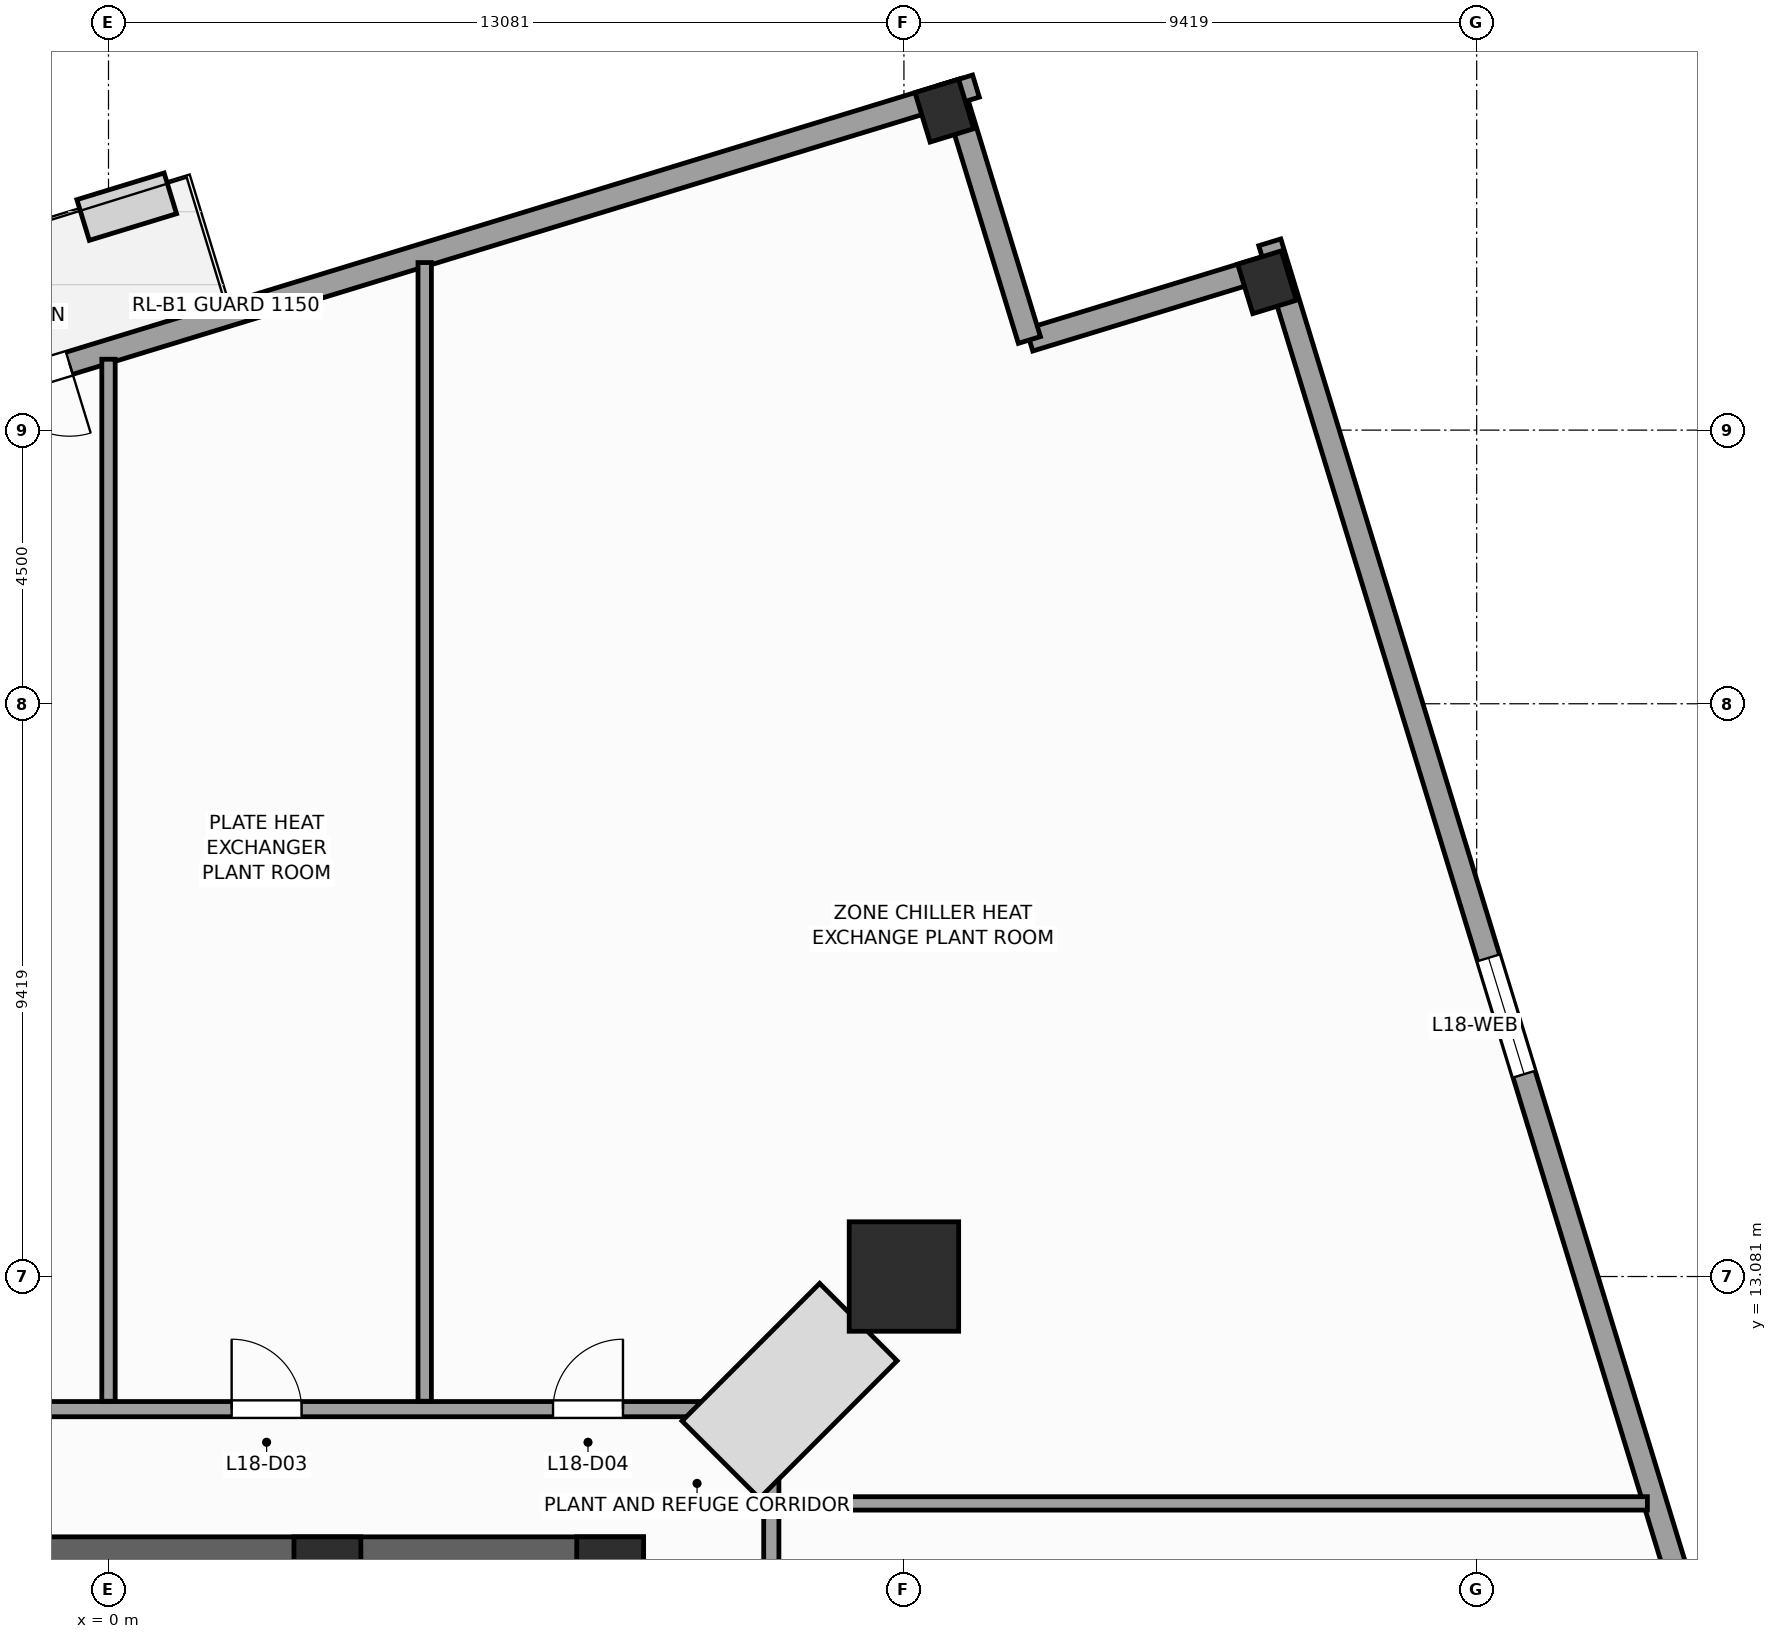
"""IFC4 building model, lengths in metres.
Left out: names, types, materials, properties, quantities, classifications, styles, units other than length and angle.
Written with IfcOpenShell. Run it as: python <this file> out.ifc"""

import sys

from ifc_helpers import new_model, si_unit, direction, frame, frame_2d, origin, origin_2d, place, context, subcontext, project, spatial, rectangle, extrude, source, transform, mapped, element, fill, save


model = new_model("IFC4")
c1 = context("Model", 3, precision=1e-05, world=origin(), true_north=direction((0.0, 1.0)))
c2 = subcontext(c1, "Body", "Model", "MODEL_VIEW")
j1 = project(units=[si_unit("LENGTHUNIT", "METRE"), si_unit("PLANEANGLEUNIT", "RADIAN")], contexts=[c1])
p1 = place(None, origin())
s1 = spatial("IfcSite", under=j1, at=p1, CompositionType="ELEMENT")
p2 = place(p1, origin())
s2 = spatial("IfcBuilding", under=s1, at=p2, CompositionType="ELEMENT")
p3 = place(p2, frame((0.0, 0.0, 78.0)))
s3 = spatial("IfcBuildingStorey", under=s2, at=p3, CompositionType="ELEMENT", Elevation=78.0)
p4 = place(p3, frame((-8.8, 8.4, 0.0), z_axis=(0.0, 0.0, 1.0), x_axis=(1.0, 0.0, 0.0)))
e1 = element("IfcWall", 1, at=p4, inside=s3, PredefinedType="SHEAR", context=c2, shape_type="SweptSolid", body=[
    extrude(rectangle(XDim=17.6, YDim=0.8, at=frame_2d((8.8, 0.0))), origin(), (0.0, 0.0, 1.0), 5.2),
])
m1 = source(origin(), c2, "Body", "SweptSolid", [
    extrude(rectangle(XDim=1.1, YDim=1.1, at=origin_2d()), origin(), (0.0, 0.0, 1.0), 5.2),
])
for number, where, z_axis, x_axis in (
    (2, (8.25, 8.25, 0.0), (0.0, 0.0, 1.0), (1.0, 0.0, 0.0)),
    (3, (3.6, 8.25, 0.0), (0.0, 0.0, 1.0), (1.0, 0.0, 0.0)),
):
    element("IfcColumn", number, at=place(p3, frame(where, z_axis=z_axis, x_axis=x_axis)), inside=s3, PredefinedType="PILASTER", context=c2, shape_type="MappedRepresentation", body=[
        mapped(m1, transform((0.0, 0.0, 0.0), scale=1.0)),
    ])
m2 = source(origin(), c2, "Body", "SweptSolid", [
    extrude(rectangle(XDim=1.8, YDim=1.8, at=origin_2d()), origin(), (0.0, 0.0, 1.0), 5.2),
])
p5 = place(p3, frame((13.081, 13.081, 0.0), z_axis=(0.0, 0.0, 1.0), x_axis=(1.0, 0.0, 0.0)))
e4 = element("IfcColumn", 4, at=p5, inside=s3, PredefinedType="COLUMN", context=c2, shape_type="MappedRepresentation", body=[
    mapped(m2, transform((0.0, 0.0, 0.0), scale=1.0)),
])
m3 = source(origin(), c2, "Body", "SweptSolid", [
    extrude(rectangle(XDim=0.75, YDim=0.85, at=origin_2d()), origin(), (0.0, 0.0, 1.0), 5.2),
])
for number, where, z_axis, x_axis in (
    (5, (19.052, 29.431, 0.0), (0.0, 0.0, 1.0), (0.956, 0.292, 0.0)),
    (6, (13.746, 32.253, 0.0), (0.0, 0.0, 1.0), (0.956, 0.292, 0.0)),
):
    element("IfcColumn", number, at=place(p3, frame(where, z_axis=z_axis, x_axis=x_axis)), inside=s3, PredefinedType="COLUMN", context=c2, shape_type="MappedRepresentation", body=[
        mapped(m3, transform((0.0, 0.0, 0.0), scale=1.0)),
    ])
p6 = place(p3, frame((19.208, 29.725, 0.0), z_axis=(0.0, 0.0, 1.0), x_axis=(-0.956312764915, -0.292345507338, 0.0)))
e7 = element("IfcWall", 7, at=p6, inside=s3, PredefinedType="STANDARD", context=c2, shape_type="SweptSolid", body=[
    extrude(rectangle(XDim=4.25, YDim=0.38, at=frame_2d((2.125, 0.0))), origin(), (0.0, 0.0, 1.0), 4.94),
])
p7 = place(p3, frame((15.144, 28.482, 0.0), z_axis=(0.0, 0.0, 1.0), x_axis=(-0.292373601522, 0.956304176051, 0.0)))
e8 = element("IfcWall", 8, at=p7, inside=s3, PredefinedType="STANDARD", context=c2, shape_type="SweptSolid", body=[
    extrude(rectangle(XDim=4.44, YDim=0.38, at=frame_2d((2.22, 0.0))), origin(), (0.0, 0.0, 1.0), 4.24),
])
p8 = place(p3, frame((26.17, 6.955, 0.0), z_axis=(0.0, 0.0, 1.0), x_axis=(-0.292372634538, 0.95630447169, 0.0)))
e9 = element("IfcWall", 9, at=p8, inside=s3, PredefinedType="STANDARD", context=c2, shape_type="SweptSolid", body=[
    extrude(rectangle(XDim=24.19, YDim=0.38, at=frame_2d((12.095, 0.0))), origin(), (0.0, 0.0, 1.0), 4.34),
])
p9 = place(p8, frame((9.885, 0.0, 0.65)))
e10 = element("IfcOpeningElement", 10, at=p9, cuts=e9, PredefinedType="OPENING", context=c2, shape_type="SweptSolid", body=[
    extrude(rectangle(XDim=2.0, YDim=1.45, at=frame_2d((1.0, 0.725))), frame((0.0, 0.2, 0.0), z_axis=(0.0, -1.0, 0.0), x_axis=(1.0, 0.0, 0.0)), (0.0, 0.0, 1.0), 0.4),
])
p10 = place(p3, frame((14.265, 32.658, 0.0), z_axis=(0.0, 0.0, 1.0), x_axis=(-0.956302978664, -0.292377517944, 0.0)))
e11 = element("IfcWall", 11, at=p10, inside=s3, PredefinedType="STANDARD", context=c2, shape_type="SweptSolid", body=[
    extrude(rectangle(XDim=17.79, YDim=0.38, at=frame_2d((8.895, 0.0))), origin(), (0.0, 0.0, 1.0), 4.34),
])
p11 = place(p10, frame((15.59, 0.0, 0.0)))
e12 = element("IfcOpeningElement", 12, at=p11, cuts=e11, PredefinedType="OPENING", context=c2, shape_type="SweptSolid", body=[
    extrude(rectangle(XDim=1.2, YDim=2.3, at=frame_2d((0.6, 1.15))), frame((0.0, 0.2, 0.0), z_axis=(0.0, -1.0, 0.0), x_axis=(1.0, 0.0, 0.0)), (0.0, 0.0, 1.0), 0.4),
])
p12 = place(p3, frame((-10.9, 10.9, 0.0), z_axis=(0.0, 0.0, 1.0), x_axis=(1.0, 0.0, 0.0)))
e13 = element("IfcWall", 13, at=p12, inside=s3, PredefinedType="PARTITIONING", context=c2, shape_type="SweptSolid", body=[
    extrude(rectangle(XDim=21.8, YDim=0.25, at=frame_2d((10.9, 0.0))), origin(), (0.0, 0.0, 1.0), 4.94),
])
p13 = place(p12, frame((2.439, 0.0, 0.0)))
e14 = element("IfcOpeningElement", 14, at=p13, cuts=e13, PredefinedType="OPENING", context=c2, shape_type="SweptSolid", body=[
    extrude(rectangle(XDim=1.15, YDim=2.25, at=frame_2d((0.575, 1.125))), frame((0.0, 0.135, 0.0), z_axis=(0.0, -1.0, 0.0), x_axis=(1.0, 0.0, 0.0)), (0.0, 0.0, 1.0), 0.27),
])
p14 = place(p12, frame((7.725, 0.0, 0.0)))
e15 = element("IfcOpeningElement", 15, at=p14, cuts=e13, PredefinedType="OPENING", context=c2, shape_type="SweptSolid", body=[
    extrude(rectangle(XDim=1.15, YDim=2.25, at=frame_2d((0.575, 1.125))), frame((0.0, 0.135, 0.0), z_axis=(0.0, -1.0, 0.0), x_axis=(1.0, 0.0, 0.0)), (0.0, 0.0, 1.0), 0.27),
])
p15 = place(p12, frame((12.925, 0.0, 0.0)))
e16 = element("IfcOpeningElement", 16, at=p15, cuts=e13, PredefinedType="OPENING", context=c2, shape_type="SweptSolid", body=[
    extrude(rectangle(XDim=1.15, YDim=2.25, at=frame_2d((0.575, 1.125))), frame((0.0, 0.135, 0.0), z_axis=(0.0, -1.0, 0.0), x_axis=(1.0, 0.0, 0.0)), (0.0, 0.0, 1.0), 0.27),
])
p16 = place(p12, frame((18.21, 0.0, 0.0)))
e17 = element("IfcOpeningElement", 17, at=p16, cuts=e13, PredefinedType="OPENING", context=c2, shape_type="SweptSolid", body=[
    extrude(rectangle(XDim=1.15, YDim=2.25, at=frame_2d((0.575, 1.125))), frame((0.0, 0.135, 0.0), z_axis=(0.0, -1.0, 0.0), x_axis=(1.0, 0.0, 0.0)), (0.0, 0.0, 1.0), 0.27),
])
p17 = place(p3, frame((10.9, -10.8, 0.0), z_axis=(0.0, 0.0, 1.0), x_axis=(0.0, 1.0, 0.0)))
e18 = element("IfcWall", 18, at=p17, inside=s3, PredefinedType="PARTITIONING", context=c2, shape_type="SweptSolid", body=[
    extrude(rectangle(XDim=21.6, YDim=0.25, at=frame_2d((10.8, 0.0))), origin(), (0.0, 0.0, 1.0), 4.94),
])
p18 = place(p17, frame((11.5, 0.0, 0.0)))
e19 = element("IfcOpeningElement", 19, at=p18, cuts=e18, PredefinedType="OPENING", context=c2, shape_type="SweptSolid", body=[
    extrude(rectangle(XDim=1.15, YDim=2.25, at=frame_2d((0.575, 1.125))), frame((0.0, 0.135, 0.0), z_axis=(0.0, -1.0, 0.0), x_axis=(1.0, 0.0, 0.0)), (0.0, 0.0, 1.0), 0.27),
])
p19 = place(p3, frame((0.0, 11.03, 0.0), z_axis=(0.0, 0.0, 1.0), x_axis=(0.0, 1.0, 0.0)))
e20 = element("IfcWall", 20, at=p19, inside=s3, PredefinedType="PARTITIONING", context=c2, shape_type="SweptSolid", body=[
    extrude(rectangle(XDim=17.136, YDim=0.22, at=frame_2d((8.568, 0.0))), origin(), (0.0, 0.0, 1.0), 4.94),
])
p20 = place(p3, frame((5.2, 11.03, 0.0), z_axis=(0.0, 0.0, 1.0), x_axis=(0.0, 1.0, 0.0)))
e21 = element("IfcWall", 21, at=p20, inside=s3, PredefinedType="PARTITIONING", context=c2, shape_type="SweptSolid", body=[
    extrude(rectangle(XDim=18.726, YDim=0.22, at=frame_2d((9.363, 0.0))), origin(), (0.0, 0.0, 1.0), 4.94),
])
p21 = place(p3, frame((11.03, 9.35, 0.0), z_axis=(0.0, 0.0, 1.0), x_axis=(1.0, 0.0, 0.0)))
e22 = element("IfcWall", 22, at=p21, inside=s3, PredefinedType="PARTITIONING", context=c2, shape_type="SweptSolid", body=[
    extrude(rectangle(XDim=14.277, YDim=0.22, at=frame_2d((7.139, 0.0))), origin(), (0.0, 0.0, 1.0), 4.24),
])
m4 = source(origin(), c2, "Body", "SweptSolid", [
    extrude(rectangle(XDim=2.0, YDim=1.45, at=frame_2d((1.0, 0.725))), frame((0.0, 0.03, 0.0), z_axis=(0.0, -1.0, 0.0), x_axis=(1.0, 0.0, 0.0)), (0.0, 0.0, 1.0), 0.06),
])
p22 = place(p9, origin())
e23 = element("IfcWindow", 23, at=p22, inside=s3, PartitioningType="SINGLE_PANEL", PredefinedType="WINDOW", context=c2, shape_type="MappedRepresentation", body=[
    mapped(m4, transform((0.0, 0.0, 0.0), scale=1.0)),
])
fill(e10, e23)
m5 = source(origin(), c2, "Body", "SweptSolid", [
    extrude(rectangle(XDim=1.2, YDim=2.3, at=frame_2d((0.6, 1.15))), frame((0.0, 0.025, 0.0), z_axis=(0.0, -1.0, 0.0), x_axis=(1.0, 0.0, 0.0)), (0.0, 0.0, 1.0), 0.05),
])
p23 = place(p11, origin())
e24 = element("IfcDoor", 24, at=p23, inside=s3, OperationType="SINGLE_SWING_LEFT", PredefinedType="DOOR", context=c2, shape_type="MappedRepresentation", body=[
    mapped(m5, transform((0.0, 0.0, 0.0), scale=1.0)),
])
fill(e12, e24)
m6 = source(origin(), c2, "Body", "SweptSolid", [
    extrude(rectangle(XDim=1.15, YDim=2.25, at=frame_2d((0.575, 1.125))), frame((0.0, 0.025, 0.0), z_axis=(0.0, -1.0, 0.0), x_axis=(1.0, 0.0, 0.0)), (0.0, 0.0, 1.0), 0.05),
])
p24 = place(p15, origin())
e25 = element("IfcDoor", 25, at=p24, inside=s3, OperationType="SINGLE_SWING_LEFT", PredefinedType="DOOR", context=c2, shape_type="MappedRepresentation", body=[
    mapped(m6, transform((0.0, 0.0, 0.0), scale=1.0)),
])
fill(e16, e25)
p25 = place(p16, origin())
e26 = element("IfcDoor", 26, at=p25, inside=s3, OperationType="SINGLE_SWING_RIGHT", PredefinedType="DOOR", context=c2, shape_type="MappedRepresentation", body=[
    mapped(m6, transform((0.0, 0.0, 0.0), scale=1.0)),
])
fill(e17, e26)
save(model, sys.argv[1])
